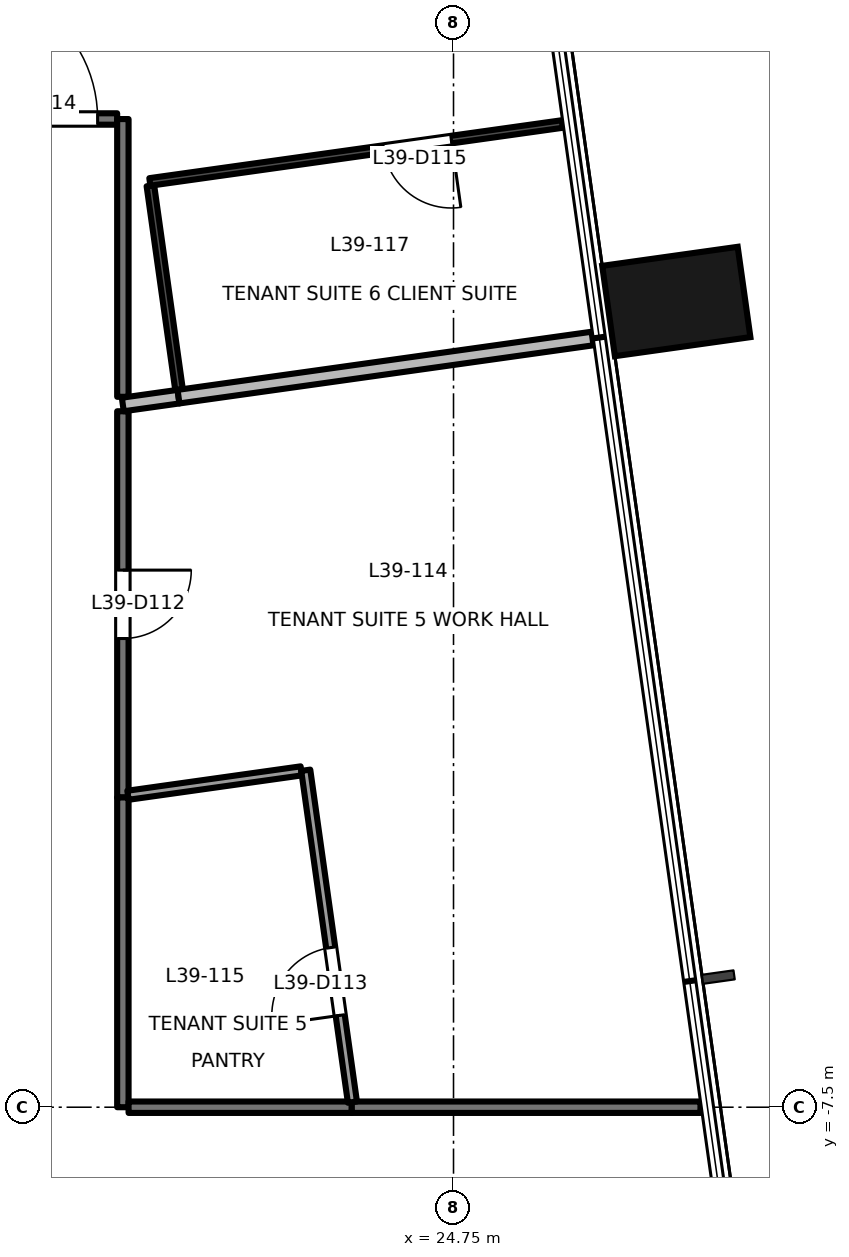
"""IFC4 building model, lengths in metres.
Left out: names, types, materials, properties, quantities, classifications, styles, units other than length and angle.
Written with IfcOpenShell. Run it as: python <this file> out.ifc"""

import sys

from ifc_helpers import new_model, si_unit, direction, frame, frame_2d, origin, origin_2d, place, context, subcontext, project, spatial, rectangle, extrude, element, fill, save


model = new_model("IFC4")
c1 = context("Model", 3, precision=1e-05, world=origin(), true_north=direction((0.0, 1.0)))
c2 = subcontext(c1, "Body", "Model", "MODEL_VIEW")
j1 = project(units=[si_unit("LENGTHUNIT", "METRE"), si_unit("PLANEANGLEUNIT", "RADIAN")], contexts=[c1])
p1 = place(None, origin())
s1 = spatial("IfcSite", under=j1, at=p1, CompositionType="ELEMENT")
p2 = place(p1, origin())
s2 = spatial("IfcBuilding", under=s1, at=p2, CompositionType="ELEMENT")
p3 = place(p2, frame((0.0, 0.0, 172.4)))
s3 = spatial("IfcBuildingStorey", under=s2, at=p3, CompositionType="ELEMENT", Elevation=172.4)
p4 = place(p3, frame((27.681, 3.1, -0.2), z_axis=(0.0, 0.0, 1.0), x_axis=(-0.139190384377, 0.990265639562, 0.0)))
e1 = element("IfcColumn", 1, at=p4, inside=s3, PredefinedType="COLUMN", context=c2, shape_type="SweptSolid", body=[
    extrude(rectangle(XDim=1.2, YDim=1.8, at=origin_2d()), origin(), (0.0, 0.0, 1.0), 3.9),
])
p5 = place(p3, frame((20.4, 1.656, 0.0), z_axis=(0.0, 0.0, 1.0), x_axis=(0.0, -1.0, 0.0)))
e2 = element("IfcWall", 2, at=p5, inside=s3, PredefinedType="PARTITIONING", context=c2, shape_type="SweptSolid", body=[
    extrude(rectangle(XDim=5.081, YDim=0.15, at=frame_2d((2.541, 0.0))), origin(), (0.0, 0.0, 1.0), 3.25),
])
p6 = place(p5, frame((2.09, 0.0, 0.0)))
e3 = element("IfcOpeningElement", 3, at=p6, cuts=e2, PredefinedType="OPENING", context=c2, shape_type="SweptSolid", body=[
    extrude(rectangle(XDim=0.9, YDim=2.1, at=frame_2d((0.45, 1.05))), frame((0.0, 0.085, 0.0), z_axis=(0.0, -1.0, 0.0), x_axis=(1.0, 0.0, 0.0)), (0.0, 0.0, 1.0), 0.171),
])
p7 = place(p3, frame((23.409, -7.5, 0.0), z_axis=(0.0, 0.0, 1.0), x_axis=(1.0, 0.0, 0.0)))
e4 = element("IfcWall", 4, at=p7, inside=s3, PredefinedType="PARTITIONING", context=c2, shape_type="SweptSolid", body=[
    extrude(rectangle(XDim=4.59, YDim=0.15, at=frame_2d((2.295, 0.0))), origin(), (0.0, 0.0, 1.0), 3.7),
])
p8 = place(p3, frame((20.4, -3.425, 0.0), z_axis=(0.0, 0.0, 1.0), x_axis=(0.0, -1.0, 0.0)))
e5 = element("IfcWall", 5, at=p8, inside=s3, PredefinedType="PARTITIONING", context=c2, shape_type="SweptSolid", body=[
    extrude(rectangle(XDim=4.075, YDim=0.15, at=frame_2d((2.038, 0.0))), origin(), (0.0, 0.0, 1.0), 3.25),
])
p9 = place(p3, frame((20.475, -7.5, 0.0), z_axis=(0.0, 0.0, 1.0), x_axis=(1.0, 0.0, 0.0)))
e6 = element("IfcWall", 6, at=p9, inside=s3, PredefinedType="PARTITIONING", context=c2, shape_type="SweptSolid", body=[
    extrude(rectangle(XDim=2.934, YDim=0.15, at=frame_2d((1.467, 0.0))), origin(), (0.0, 0.0, 1.0), 3.7),
])
p10 = place(p3, frame((18.0, 5.501, 0.0), z_axis=(0.0, 0.0, 1.0), x_axis=(1.0, 0.0, 0.0)))
e7 = element("IfcWall", 7, at=p10, inside=s3, PredefinedType="PARTITIONING", context=c2, shape_type="SweptSolid", body=[
    extrude(rectangle(XDim=2.325, YDim=0.15, at=frame_2d((1.163, 0.0))), origin(), (0.0, 0.0, 1.0), 3.7),
])
p11 = place(p10, frame((0.268, 0.0, 0.0)))
e8 = element("IfcOpeningElement", 8, at=p11, cuts=e7, PredefinedType="OPENING", context=c2, shape_type="SweptSolid", body=[
    extrude(rectangle(XDim=1.8, YDim=2.1, at=frame_2d((0.9, 1.05))), frame((0.0, 0.085, 0.0), z_axis=(0.0, -1.0, 0.0), x_axis=(1.0, 0.0, 0.0)), (0.0, 0.0, 1.0), 0.171),
])
p12 = place(p3, frame((20.4, 5.5, 0.0), z_axis=(0.0, 0.0, 1.0), x_axis=(0.0, -1.0, 0.0)))
e9 = element("IfcWall", 9, at=p12, inside=s3, PredefinedType="PARTITIONING", context=c2, shape_type="SweptSolid", body=[
    extrude(rectangle(XDim=3.654, YDim=0.15, at=frame_2d((1.827, 0.0))), origin(), (0.0, 0.0, 1.0), 3.25),
])
p13 = place(p3, frame((22.747, -3.075, 0.0), z_axis=(0.0, 0.0, 1.0), x_axis=(-0.990231660618, -0.139431912808, 0.0)))
e10 = element("IfcWall", 10, at=p13, inside=s3, PredefinedType="PARTITIONING", context=c2, shape_type="SweptSolid", body=[
    extrude(rectangle(XDim=2.302, YDim=0.12, at=frame_2d((1.151, 0.0))), origin(), (0.0, 0.0, 1.0), 3.7),
])
p14 = place(p3, frame((23.42, -7.433, 0.0), z_axis=(0.0, 0.0, 1.0), x_axis=(-0.13925822498, 0.99025610161, 0.0)))
e11 = element("IfcWall", 11, at=p14, inside=s3, PredefinedType="PARTITIONING", context=c2, shape_type="SweptSolid", body=[
    extrude(rectangle(XDim=4.409, YDim=0.12, at=frame_2d((2.205, 0.0))), origin(), (0.0, 0.0, 1.0), 3.25),
])
p15 = place(p14, frame((1.153, 0.0, 0.0)))
e12 = element("IfcOpeningElement", 12, at=p15, cuts=e11, PredefinedType="OPENING", context=c2, shape_type="SweptSolid", body=[
    extrude(rectangle(XDim=0.9, YDim=2.1, at=frame_2d((0.45, 1.05))), frame((0.0, 0.071, 0.0), z_axis=(0.0, -1.0, 0.0), x_axis=(1.0, 0.0, 0.0)), (0.0, 0.0, 1.0), 0.141),
])
p16 = place(p3, frame((20.399, 1.745, 0.0), z_axis=(0.0, 0.0, 1.0), x_axis=(0.990315465901, 0.138835434947, 0.0)))
e13 = element("IfcWall", 13, at=p16, inside=s3, PredefinedType="PARTITIONING", context=c2, shape_type="SweptSolid", body=[
    extrude(rectangle(XDim=0.74, YDim=0.18, at=frame_2d((0.37, 0.0))), origin(), (0.0, 0.0, 1.0), 3.7),
])
p17 = place(p3, frame((21.132, 1.848, 0.0), z_axis=(0.0, 0.0, 1.0), x_axis=(0.990277893792, 0.139103174181, 0.0)))
e14 = element("IfcWall", 14, at=p17, inside=s3, PredefinedType="PARTITIONING", context=c2, shape_type="SweptSolid", body=[
    extrude(rectangle(XDim=5.5, YDim=0.18, at=frame_2d((2.75, 0.0))), origin(), (0.0, 0.0, 1.0), 3.7),
])
p18 = place(p3, frame((20.762, 4.623, 0.0), z_axis=(0.0, 0.0, 1.0), x_axis=(0.139125052108, -0.990274820379, 0.0)))
e15 = element("IfcWall", 15, at=p18, inside=s3, PredefinedType="PARTITIONING", context=c2, shape_type="SweptSolid", body=[
    extrude(rectangle(XDim=2.709, YDim=0.1, at=frame_2d((1.355, 0.0))), origin(), (0.0, 0.0, 1.0), 3.25),
])
p19 = place(p3, frame((26.181, 5.435, 0.0), z_axis=(0.0, 0.0, 1.0), x_axis=(-0.990283537783, -0.13906298859, 0.0)))
e16 = element("IfcWall", 16, at=p19, inside=s3, PredefinedType="PARTITIONING", context=c2, shape_type="SweptSolid", body=[
    extrude(rectangle(XDim=5.479, YDim=0.1, at=frame_2d((2.74, 0.0))), origin(), (0.0, 0.0, 1.0), 3.7),
])
p20 = place(p19, frame((1.474, 0.0, 0.0)))
e17 = element("IfcOpeningElement", 17, at=p20, cuts=e16, PredefinedType="OPENING", context=c2, shape_type="SweptSolid", body=[
    extrude(rectangle(XDim=0.9, YDim=2.1, at=frame_2d((0.45, 1.05))), frame((0.0, 0.061, 0.0), z_axis=(0.0, -1.0, 0.0), x_axis=(1.0, 0.0, 0.0)), (0.0, 0.0, 1.0), 0.121),
])
p21 = place(p6, origin())
e18 = element("IfcDoor", 18, at=p21, inside=s3, OperationType="SINGLE_SWING_LEFT", PredefinedType="DOOR", context=c2, shape_type="SweptSolid", body=[
    extrude(rectangle(XDim=0.9, YDim=2.1, at=frame_2d((0.45, 1.05))), frame((0.0, 0.025, 0.0), z_axis=(0.0, -1.0, 0.0), x_axis=(1.0, 0.0, 0.0)), (0.0, 0.0, 1.0), 0.05),
])
fill(e3, e18)
p22 = place(p15, origin())
e19 = element("IfcDoor", 19, at=p22, inside=s3, OperationType="SINGLE_SWING_LEFT", PredefinedType="DOOR", context=c2, shape_type="SweptSolid", body=[
    extrude(rectangle(XDim=0.9, YDim=2.1, at=frame_2d((0.45, 1.05))), frame((0.0, 0.025, 0.0), z_axis=(0.0, -1.0, 0.0), x_axis=(1.0, 0.0, 0.0)), (0.0, 0.0, 1.0), 0.05),
])
fill(e12, e19)
p23 = place(p11, origin())
e20 = element("IfcDoor", 20, at=p23, inside=s3, OperationType="DOUBLE_DOOR_SINGLE_SWING", PredefinedType="DOOR", context=c2, shape_type="SweptSolid", body=[
    extrude(rectangle(XDim=1.8, YDim=2.1, at=frame_2d((0.9, 1.05))), frame((0.0, 0.025, 0.0), z_axis=(0.0, -1.0, 0.0), x_axis=(1.0, 0.0, 0.0)), (0.0, 0.0, 1.0), 0.05),
])
fill(e8, e20)
p24 = place(p20, origin())
e21 = element("IfcDoor", 21, at=p24, inside=s3, OperationType="SINGLE_SWING_LEFT", PredefinedType="DOOR", context=c2, shape_type="SweptSolid", body=[
    extrude(rectangle(XDim=0.9, YDim=2.1, at=frame_2d((0.45, 1.05))), frame((0.0, 0.025, 0.0), z_axis=(0.0, -1.0, 0.0), x_axis=(1.0, 0.0, 0.0)), (0.0, 0.0, 1.0), 0.05),
])
fill(e17, e21)
save(model, sys.argv[1])
